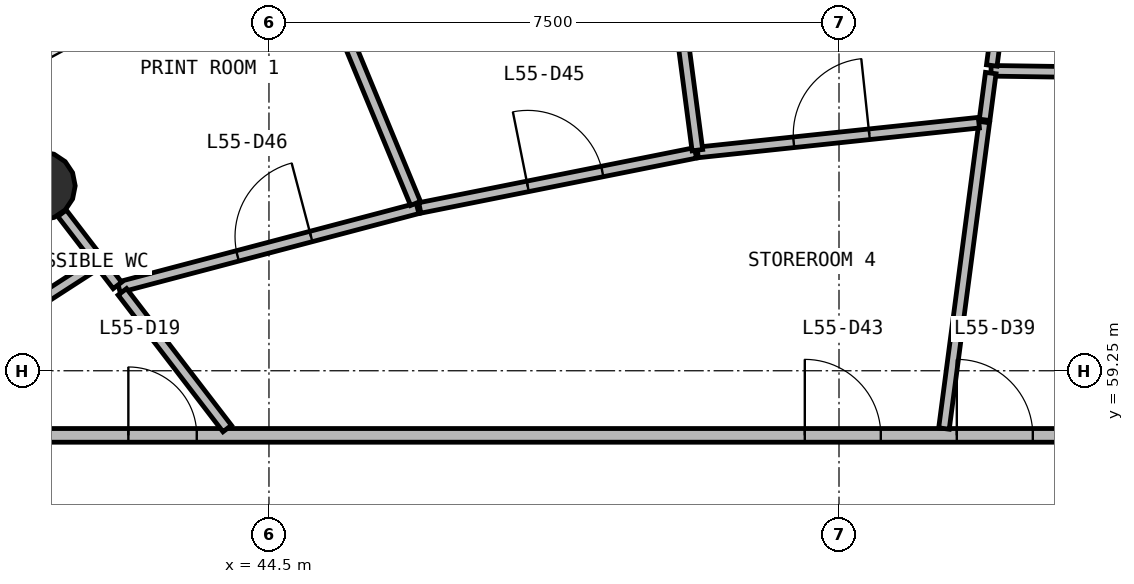
"""IFC4 building model, lengths in metres.
Left out: names, types, materials, properties, quantities, classifications, styles, units other than length and angle.
Written with IfcOpenShell. Run it as: python <this file> out.ifc"""

import sys

from ifc_helpers import new_model, si_unit, direction, frame, frame_2d, origin, origin_2d, place, context, subcontext, project, spatial, rectangle, circle, extrude, source, transform, mapped, element, fill, save


model = new_model("IFC4")
c1 = context("Model", 3, precision=1e-05, world=origin(), true_north=direction((0.0, 1.0)))
c2 = subcontext(c1, "Body", "Model", "MODEL_VIEW")
j1 = project(units=[si_unit("LENGTHUNIT", "METRE"), si_unit("PLANEANGLEUNIT", "RADIAN")], contexts=[c1])
p1 = place(None, origin())
s1 = spatial("IfcSite", under=j1, at=p1, CompositionType="ELEMENT")
p2 = place(p1, origin())
s2 = spatial("IfcBuilding", under=s1, at=p2, CompositionType="ELEMENT")
p3 = place(p2, frame((0.0, 0.0, 226.7)))
s3 = spatial("IfcBuildingStorey", under=s2, at=p3, CompositionType="ELEMENT", Elevation=226.7)
m1 = source(origin(), c2, "Body", "SweptSolid", [
    extrude(circle(Radius=0.45, at=origin_2d()), origin(), (0.0, 0.0, 1.0), 3.9),
])
p4 = place(p3, frame((41.501, 61.683, 0.0), z_axis=(0.0, 0.0, 1.0), x_axis=(1.0, 0.0, 0.0)))
e1 = element("IfcColumn", 1, at=p4, inside=s3, PredefinedType="COLUMN", context=c2, shape_type="MappedRepresentation", body=[
    mapped(m1, transform((0.0, 0.0, 0.0), scale=1.0)),
])
p5 = place(p3, frame((40.6, 58.4, 0.0), z_axis=(0.0, 0.0, 1.0), x_axis=(1.0, 0.0, 0.0)))
e2 = element("IfcWall", 2, at=p5, inside=s3, PredefinedType="PARTITIONING", context=c2, shape_type="SweptSolid", body=[
    extrude(rectangle(XDim=22.8, YDim=0.18, at=frame_2d((11.4, 0.0))), origin(), (0.0, 0.0, 1.0), 2.7),
])
p6 = place(p5, frame((2.05, 0.0, 0.0)))
e3 = element("IfcOpeningElement", 3, at=p6, cuts=e2, PredefinedType="OPENING", context=c2, shape_type="SweptSolid", body=[
    extrude(rectangle(XDim=0.9, YDim=2.1, at=frame_2d((0.45, 1.05))), frame((0.0, 0.1, 0.0), z_axis=(0.0, -1.0, 0.0), x_axis=(1.0, 0.0, 0.0)), (0.0, 0.0, 1.0), 0.2),
])
p7 = place(p5, frame((12.95, 0.0, 0.0)))
e4 = element("IfcOpeningElement", 4, at=p7, cuts=e2, PredefinedType="OPENING", context=c2, shape_type="SweptSolid", body=[
    extrude(rectangle(XDim=1.0, YDim=2.1, at=frame_2d((0.5, 1.05))), frame((0.0, 0.1, 0.0), z_axis=(0.0, -1.0, 0.0), x_axis=(1.0, 0.0, 0.0)), (0.0, 0.0, 1.0), 0.2),
])
p8 = place(p5, frame((10.95, 0.0, 0.0)))
e5 = element("IfcOpeningElement", 5, at=p8, cuts=e2, PredefinedType="OPENING", context=c2, shape_type="SweptSolid", body=[
    extrude(rectangle(XDim=1.0, YDim=2.1, at=frame_2d((0.5, 1.05))), frame((0.0, 0.1, 0.0), z_axis=(0.0, -1.0, 0.0), x_axis=(1.0, 0.0, 0.0)), (0.0, 0.0, 1.0), 0.2),
])
p9 = place(p3, frame((42.27, 60.68, 0.0), z_axis=(0.0, 0.0, 1.0), x_axis=(-0.839801255045, -0.542893960202, 0.0)))
e6 = element("IfcWall", 6, at=p9, inside=s3, PredefinedType="PARTITIONING", context=c2, shape_type="SweptSolid", body=[
    extrude(rectangle(XDim=4.392, YDim=0.14, at=frame_2d((2.196, 0.0))), origin(), (0.0, 0.0, 1.0), 2.7),
])
p10 = place(p3, frame((54.0, 63.196, 0.0), z_axis=(0.0, 0.0, 1.0), x_axis=(0.99989466978, -0.014513763999, 0.0)))
e7 = element("IfcWall", 7, at=p10, inside=s3, PredefinedType="PARTITIONING", context=c2, shape_type="SweptSolid", body=[
    extrude(rectangle(XDim=4.239, YDim=0.14, at=frame_2d((2.12, 0.0))), origin(), (0.0, 0.0, 1.0), 2.7),
])
p11 = place(p10, frame((1.589, 0.0, 0.0)))
e8 = element("IfcOpeningElement", 8, at=p11, cuts=e7, PredefinedType="OPENING", context=c2, shape_type="SweptSolid", body=[
    extrude(rectangle(XDim=1.0, YDim=2.1, at=frame_2d((0.5, 1.05))), frame((0.0, 0.08, 0.0), z_axis=(0.0, -1.0, 0.0), x_axis=(1.0, 0.0, 0.0)), (0.0, 0.0, 1.0), 0.16),
])
p12 = place(p3, frame((53.381, 58.49, 0.0), z_axis=(0.0, 0.0, 1.0), x_axis=(0.13052750874, 0.99144468805, 0.0)))
e9 = element("IfcWall", 9, at=p12, inside=s3, PredefinedType="PARTITIONING", context=c2, shape_type="SweptSolid", body=[
    extrude(rectangle(XDim=4.066, YDim=0.14, at=frame_2d((2.033, 0.0))), origin(), (0.0, 0.0, 1.0), 2.7),
])
p13 = place(p3, frame((42.524, 60.349, 0.0), z_axis=(0.0, 0.0, 1.0), x_axis=(0.966913320751, 0.255105135492, 0.0)))
e10 = element("IfcWall", 10, at=p13, inside=s3, PredefinedType="PARTITIONING", context=c2, shape_type="SweptSolid", body=[
    extrude(rectangle(XDim=4.065, YDim=0.14, at=frame_2d((2.033, 0.0))), origin(), (0.0, 0.0, 1.0), 2.7),
])
p14 = place(p13, frame((1.615, 0.0, 0.0)))
e11 = element("IfcOpeningElement", 11, at=p14, cuts=e10, PredefinedType="OPENING", context=c2, shape_type="SweptSolid", body=[
    extrude(rectangle(XDim=1.0, YDim=2.1, at=frame_2d((0.5, 1.05))), frame((0.0, 0.08, 0.0), z_axis=(0.0, -1.0, 0.0), x_axis=(1.0, 0.0, 0.0)), (0.0, 0.0, 1.0), 0.16),
])
p15 = place(p3, frame((50.141, 62.122, 0.0), z_axis=(0.0, 0.0, 1.0), x_axis=(0.994443424191, 0.105272389942, 0.0)))
e12 = element("IfcWall", 12, at=p15, inside=s3, PredefinedType="PARTITIONING", context=c2, shape_type="SweptSolid", body=[
    extrude(rectangle(XDim=3.72, YDim=0.14, at=frame_2d((1.86, 0.0))), origin(), (0.0, 0.0, 1.0), 2.7),
])
p16 = place(p15, frame((1.27, 0.0, 0.0)))
e13 = element("IfcOpeningElement", 13, at=p16, cuts=e12, PredefinedType="OPENING", context=c2, shape_type="SweptSolid", body=[
    extrude(rectangle(XDim=1.0, YDim=2.1, at=frame_2d((0.5, 1.05))), frame((0.0, 0.08, 0.0), z_axis=(0.0, -1.0, 0.0), x_axis=(1.0, 0.0, 0.0)), (0.0, 0.0, 1.0), 0.16),
])
p17 = place(p3, frame((46.485, 61.392, 0.0), z_axis=(0.0, 0.0, 1.0), x_axis=(0.980631422481, 0.195862230259, 0.0)))
e14 = element("IfcWall", 14, at=p17, inside=s3, PredefinedType="PARTITIONING", context=c2, shape_type="SweptSolid", body=[
    extrude(rectangle(XDim=3.698, YDim=0.14, at=frame_2d((1.849, 0.0))), origin(), (0.0, 0.0, 1.0), 2.7),
])
p18 = place(p17, frame((1.448, 0.0, 0.0)))
e15 = element("IfcOpeningElement", 15, at=p18, cuts=e14, PredefinedType="OPENING", context=c2, shape_type="SweptSolid", body=[
    extrude(rectangle(XDim=1.0, YDim=2.1, at=frame_2d((0.5, 1.05))), frame((0.0, 0.08, 0.0), z_axis=(0.0, -1.0, 0.0), x_axis=(1.0, 0.0, 0.0)), (0.0, 0.0, 1.0), 0.16),
])
p19 = place(p3, frame((50.137, 62.152, 0.0), z_axis=(0.0, 0.0, 1.0), x_axis=(-0.130577981436, 0.991438041818, 0.0)))
e16 = element("IfcWall", 16, at=p19, inside=s3, PredefinedType="PARTITIONING", context=c2, shape_type="SweptSolid", body=[
    extrude(rectangle(XDim=2.864, YDim=0.14, at=frame_2d((1.432, 0.0))), origin(), (0.0, 0.0, 1.0), 2.7),
])
p20 = place(p3, frame((54.01, 63.266, 0.0), z_axis=(0.0, 0.0, 1.0), x_axis=(0.130591396483, 0.991436274888, 0.0)))
e17 = element("IfcWall", 17, at=p20, inside=s3, PredefinedType="PARTITIONING", context=c2, shape_type="SweptSolid", body=[
    extrude(rectangle(XDim=2.584, YDim=0.14, at=frame_2d((1.292, 0.0))), origin(), (0.0, 0.0, 1.0), 2.7),
])
p21 = place(p3, frame((43.951, 58.49, 0.0), z_axis=(0.0, 0.0, 1.0), x_axis=(-0.608700561504, 0.793400041861, 0.0)))
e18 = element("IfcWall", 18, at=p21, inside=s3, PredefinedType="PARTITIONING", context=c2, shape_type="SweptSolid", body=[
    extrude(rectangle(XDim=2.267, YDim=0.14, at=frame_2d((1.133, 0.0))), origin(), (0.0, 0.0, 1.0), 2.7),
])
p22 = place(p3, frame((46.428, 61.451, 0.0), z_axis=(0.0, 0.0, 1.0), x_axis=(-0.382654863797, 0.923891365482, 0.0)))
e19 = element("IfcWall", 19, at=p22, inside=s3, PredefinedType="PARTITIONING", context=c2, shape_type="SweptSolid", body=[
    extrude(rectangle(XDim=2.229, YDim=0.14, at=frame_2d((1.115, 0.0))), origin(), (0.0, 0.0, 1.0), 2.7),
])
p23 = place(p3, frame((42.227, 60.736, 0.0), z_axis=(0.0, 0.0, 1.0), x_axis=(-0.608736601205, 0.793372390718, 0.0)))
e20 = element("IfcWall", 20, at=p23, inside=s3, PredefinedType="PARTITIONING", context=c2, shape_type="SweptSolid", body=[
    extrude(rectangle(XDim=0.739, YDim=0.14, at=frame_2d((0.37, 0.0))), origin(), (0.0, 0.0, 1.0), 2.7),
])
p24 = place(p3, frame((53.916, 62.551, 0.0), z_axis=(0.0, 0.0, 1.0), x_axis=(0.130230601284, 0.991483731833, 0.0)))
e21 = element("IfcWall", 21, at=p24, inside=s3, PredefinedType="PARTITIONING", context=c2, shape_type="SweptSolid", body=[
    extrude(rectangle(XDim=0.621, YDim=0.14, at=frame_2d((0.31, 0.0))), origin(), (0.0, 0.0, 1.0), 2.7),
])
p25 = place(p3, frame((42.506, 60.373, 0.0), z_axis=(0.0, 0.0, 1.0), x_axis=(-0.609018395773, 0.793156096623, 0.0)))
e22 = element("IfcWall", 22, at=p25, inside=s3, PredefinedType="PARTITIONING", context=c2, shape_type="SweptSolid", body=[
    extrude(rectangle(XDim=0.358, YDim=0.14, at=frame_2d((0.179, 0.0))), origin(), (0.0, 0.0, 1.0), 2.7),
])
m2 = source(origin(), c2, "Body", "SweptSolid", [
    extrude(rectangle(XDim=0.9, YDim=2.1, at=frame_2d((0.45, 1.05))), frame((0.0, 0.025, 0.0), z_axis=(0.0, -1.0, 0.0), x_axis=(1.0, 0.0, 0.0)), (0.0, 0.0, 1.0), 0.05),
])
p26 = place(p6, origin())
e23 = element("IfcDoor", 23, at=p26, inside=s3, OperationType="SINGLE_SWING_LEFT", PredefinedType="DOOR", context=c2, shape_type="MappedRepresentation", body=[
    mapped(m2, transform((0.0, 0.0, 0.0), scale=1.0)),
])
fill(e3, e23)
m3 = source(origin(), c2, "Body", "SweptSolid", [
    extrude(rectangle(XDim=1.0, YDim=2.1, at=frame_2d((0.5, 1.05))), frame((0.0, 0.025, 0.0), z_axis=(0.0, -1.0, 0.0), x_axis=(1.0, 0.0, 0.0)), (0.0, 0.0, 1.0), 0.05),
])
p27 = place(p7, origin())
e24 = element("IfcDoor", 24, at=p27, inside=s3, OperationType="SINGLE_SWING_LEFT", PredefinedType="DOOR", context=c2, shape_type="MappedRepresentation", body=[
    mapped(m3, transform((0.0, 0.0, 0.0), scale=1.0)),
])
fill(e4, e24)
p28 = place(p8, origin())
e25 = element("IfcDoor", 25, at=p28, inside=s3, OperationType="SINGLE_SWING_LEFT", PredefinedType="DOOR", context=c2, shape_type="MappedRepresentation", body=[
    mapped(m3, transform((0.0, 0.0, 0.0), scale=1.0)),
])
fill(e5, e25)
p29 = place(p16, origin())
e26 = element("IfcDoor", 26, at=p29, inside=s3, OperationType="SINGLE_SWING_RIGHT", PredefinedType="DOOR", context=c2, shape_type="MappedRepresentation", body=[
    mapped(m3, transform((0.0, 0.0, 0.0), scale=1.0)),
])
fill(e13, e26)
p30 = place(p18, origin())
e27 = element("IfcDoor", 27, at=p30, inside=s3, OperationType="SINGLE_SWING_LEFT", PredefinedType="DOOR", context=c2, shape_type="MappedRepresentation", body=[
    mapped(m3, transform((0.0, 0.0, 0.0), scale=1.0)),
])
fill(e15, e27)
p31 = place(p14, origin())
e28 = element("IfcDoor", 28, at=p31, inside=s3, OperationType="SINGLE_SWING_RIGHT", PredefinedType="DOOR", context=c2, shape_type="MappedRepresentation", body=[
    mapped(m3, transform((0.0, 0.0, 0.0), scale=1.0)),
])
fill(e11, e28)
save(model, sys.argv[1])
